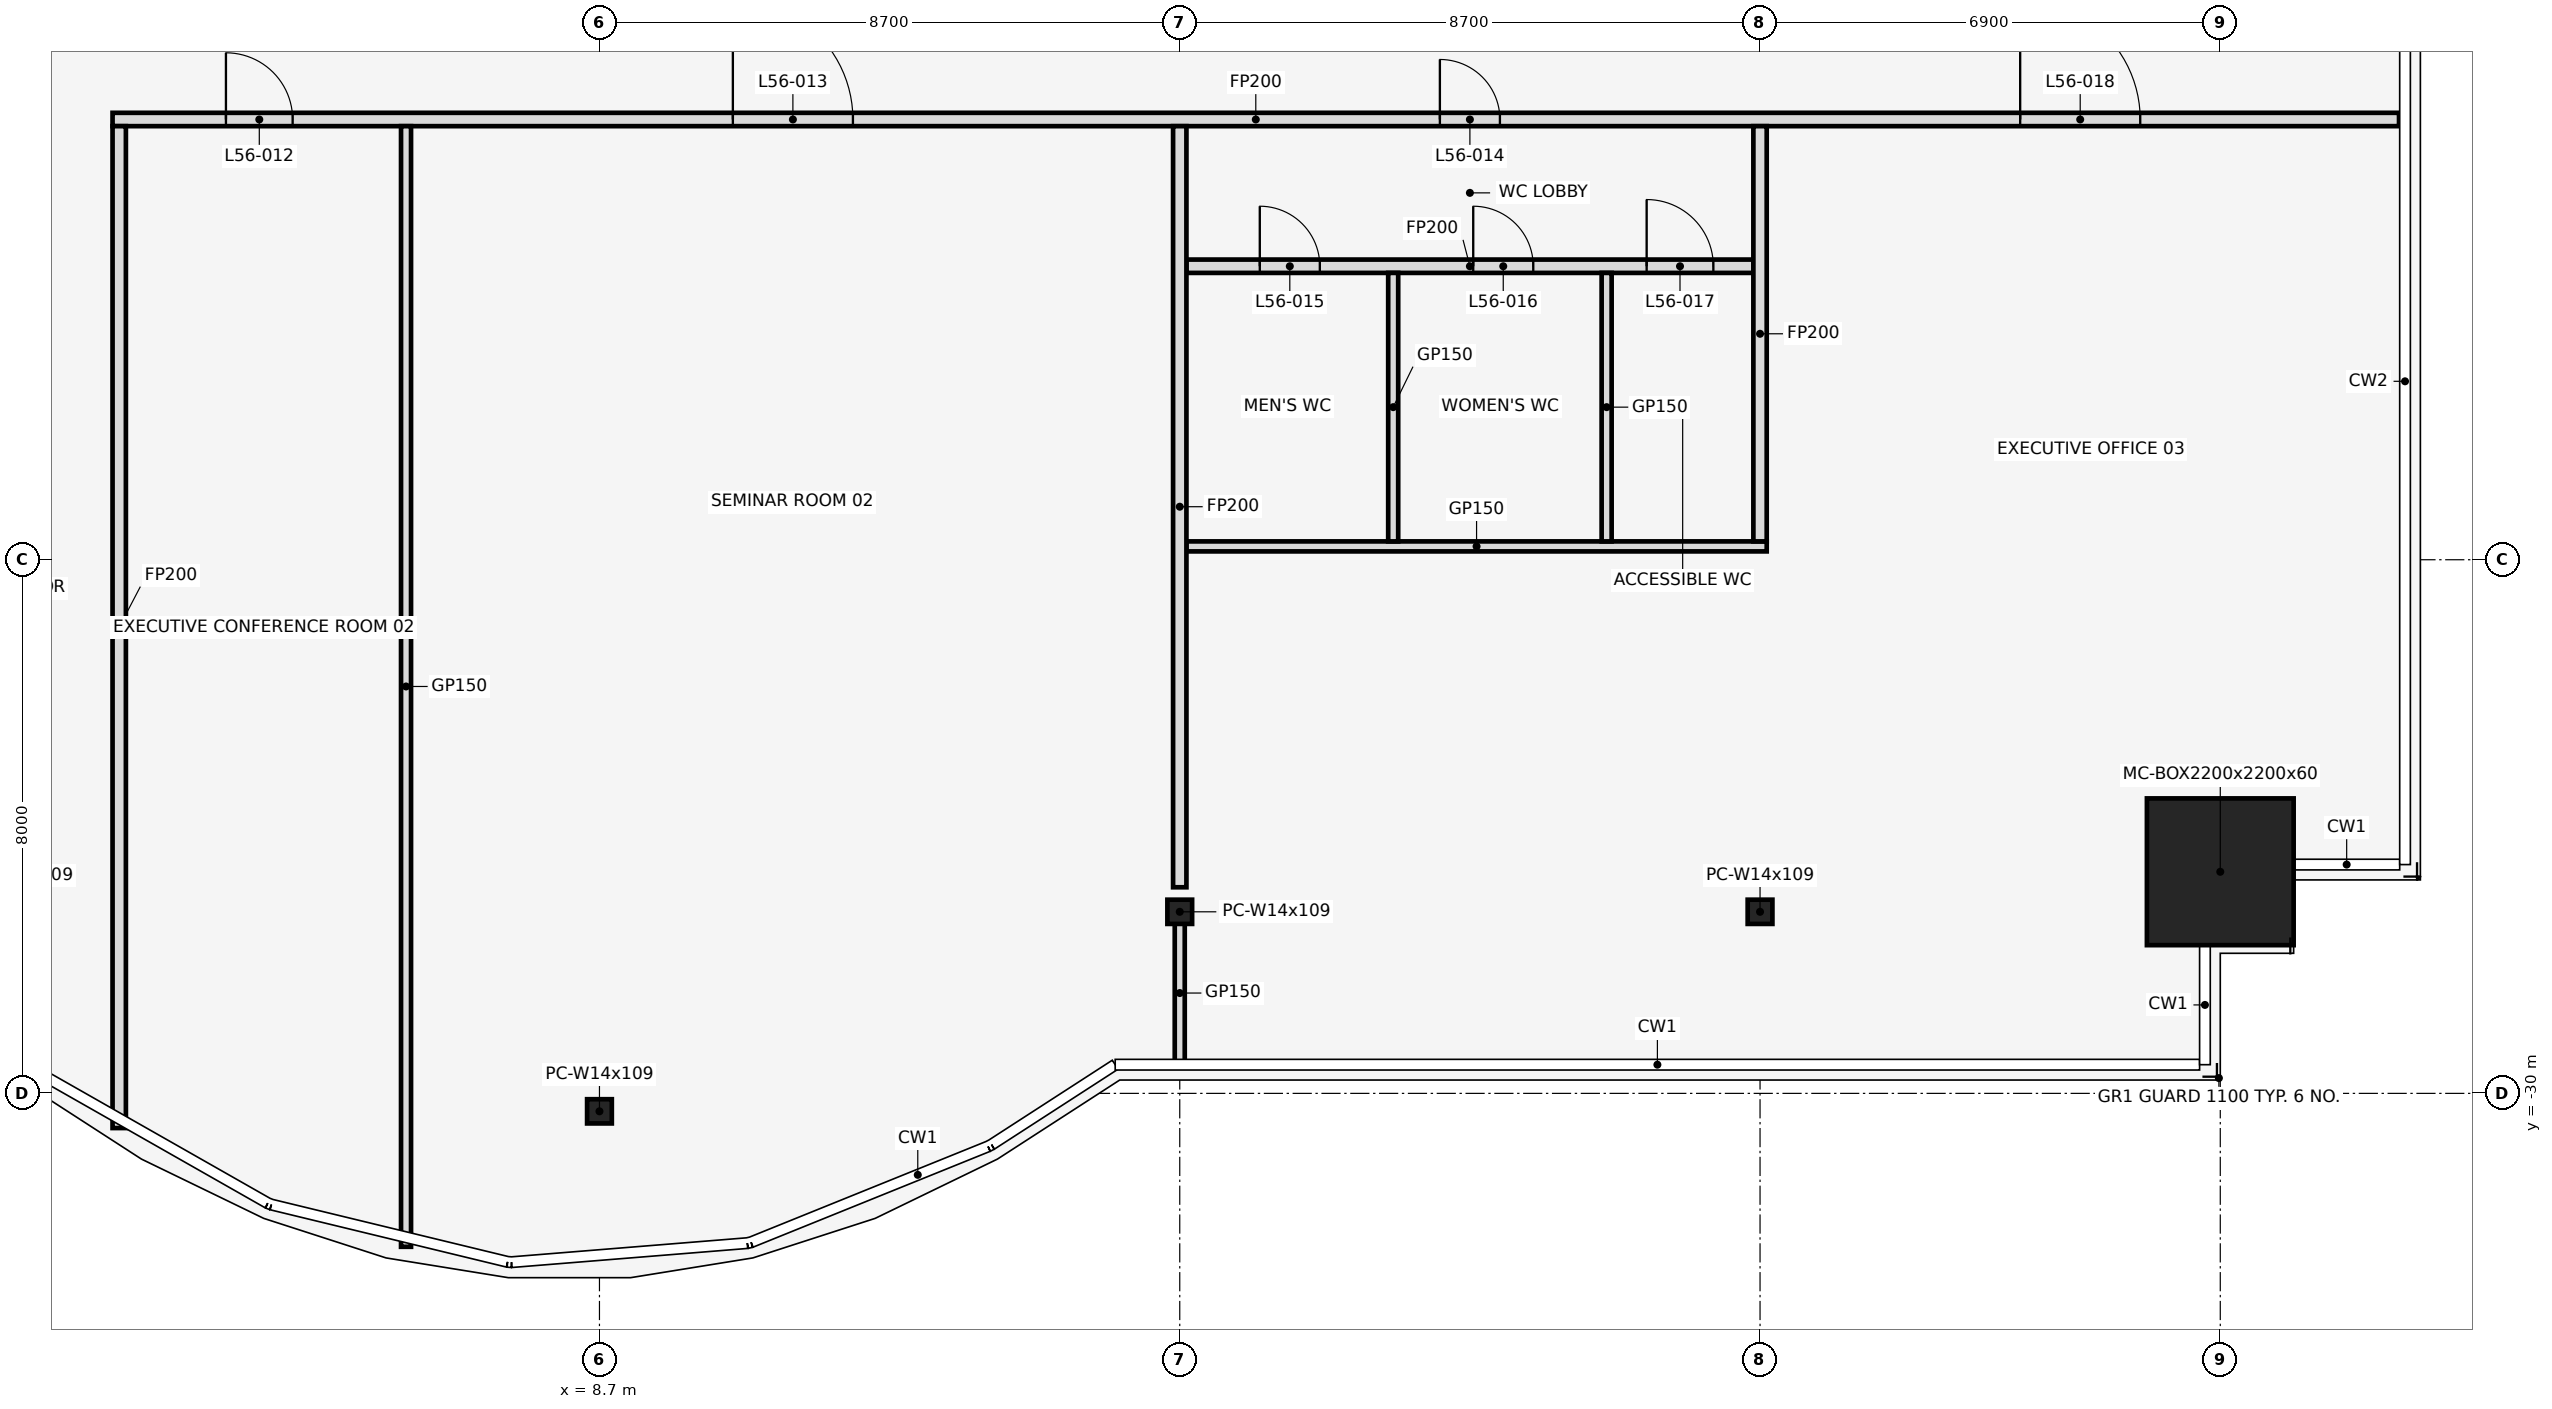
"""IFC4 building model, lengths in metres.
Left out: names, types, materials, properties, quantities, classifications, styles, units other than length and angle.
Written with IfcOpenShell. Run it as: python <this file> out.ifc"""

import sys

from ifc_helpers import new_model, si_unit, direction, frame, frame_2d, origin, origin_2d, place, context, subcontext, project, spatial, rectangle, hollow_rectangle, i_section, extrude, element, fill, save


model = new_model("IFC4")
c1 = context("Model", 3, precision=1e-05, world=origin(), true_north=direction((0.0, 1.0)))
c2 = subcontext(c1, "Body", "Model", "MODEL_VIEW")
j1 = project(units=[si_unit("LENGTHUNIT", "METRE"), si_unit("PLANEANGLEUNIT", "RADIAN")], contexts=[c1])
p1 = place(None, origin())
s1 = spatial("IfcSite", under=j1, at=p1, CompositionType="ELEMENT")
p2 = place(p1, origin())
s2 = spatial("IfcBuilding", under=s1, at=p2, CompositionType="ELEMENT")
p3 = place(p2, frame((0.0, 0.0, 249.8)))
s3 = spatial("IfcBuildingStorey", under=s2, at=p3, CompositionType="ELEMENT", Elevation=249.8)
for number, where, z_axis, x_axis in (
    (1, (8.7, -30.269, 0.0), (0.0, 0.0, 1.0), (1.0, 0.0, 0.0)),
    (2, (17.4, -27.278, 0.0), (0.0, 0.0, 1.0), (1.0, 0.0, 0.0)),
    (3, (26.1, -27.278, 0.0), (0.0, 0.0, 1.0), (1.0, 0.0, 0.0)),
):
    element("IfcColumn", number, at=place(p3, frame(where, z_axis=z_axis, x_axis=x_axis)), inside=s3, PredefinedType="COLUMN", context=c2, shape_type="SweptSolid", body=[
        extrude(i_section(OverallWidth=0.371, OverallDepth=0.363, WebThickness=0.013, FlangeThickness=0.022, at=origin_2d()), origin(), (0.0, 0.0, 1.0), 4.2),
    ])
p4 = place(p3, frame((33.0, -26.678, 0.0), z_axis=(0.0, 0.0, 1.0), x_axis=(1.0, 0.0, 0.0)))
e4 = element("IfcColumn", 4, at=p4, inside=s3, PredefinedType="COLUMN", context=c2, shape_type="SweptSolid", body=[
    extrude(hollow_rectangle(XDim=2.2, YDim=2.2, WallThickness=0.06, at=origin_2d()), origin(), (0.0, 0.0, 1.0), 4.2),
])
p5 = place(p3, frame((17.5, -21.8, 0.0), z_axis=(0.0, 0.0, 1.0), x_axis=(1.0, 0.0, 0.0)))
e5 = element("IfcWall", 5, at=p5, inside=s3, PredefinedType="PARTITIONING", context=c2, shape_type="SweptSolid", body=[
    extrude(rectangle(XDim=8.7, YDim=0.15, at=frame_2d((4.35, 0.0))), origin(), (0.0, 0.0, 1.0), 3.039),
])
p6 = place(p3, frame((17.5, -17.6, 0.0), z_axis=(0.0, 0.0, 1.0), x_axis=(1.0, 0.0, 0.0)))
e6 = element("IfcWall", 6, at=p6, inside=s3, PredefinedType="PARTITIONING", context=c2, shape_type="SweptSolid", body=[
    extrude(rectangle(XDim=8.5, YDim=0.2, at=frame_2d((4.25, 0.0))), origin(), (0.0, 0.0, 1.0), 3.039),
])
p7 = place(p6, frame((1.1, 0.0, 0.0)))
e7 = element("IfcOpeningElement", 7, at=p7, cuts=e6, PredefinedType="OPENING", context=c2, shape_type="SweptSolid", body=[
    extrude(rectangle(XDim=0.9, YDim=2.1, at=frame_2d((0.45, 1.05))), frame((0.0, 0.112, 0.0), z_axis=(0.0, -1.0, 0.0), x_axis=(1.0, 0.0, 0.0)), (0.0, 0.0, 1.0), 0.224),
])
p8 = place(p6, frame((4.3, 0.0, 0.0)))
e8 = element("IfcOpeningElement", 8, at=p8, cuts=e6, PredefinedType="OPENING", context=c2, shape_type="SweptSolid", body=[
    extrude(rectangle(XDim=0.9, YDim=2.1, at=frame_2d((0.45, 1.05))), frame((0.0, 0.112, 0.0), z_axis=(0.0, -1.0, 0.0), x_axis=(1.0, 0.0, 0.0)), (0.0, 0.0, 1.0), 0.224),
])
p9 = place(p6, frame((6.9, 0.0, 0.0)))
e9 = element("IfcOpeningElement", 9, at=p9, cuts=e6, PredefinedType="OPENING", context=c2, shape_type="SweptSolid", body=[
    extrude(rectangle(XDim=1.0, YDim=2.1, at=frame_2d((0.5, 1.05))), frame((0.0, 0.112, 0.0), z_axis=(0.0, -1.0, 0.0), x_axis=(1.0, 0.0, 0.0)), (0.0, 0.0, 1.0), 0.224),
])
p10 = place(p3, frame((1.4, -15.4, 0.0), z_axis=(0.0, 0.0, 1.0), x_axis=(1.0, 0.0, 0.0)))
e10 = element("IfcWall", 10, at=p10, inside=s3, PredefinedType="PARTITIONING", context=c2, shape_type="SweptSolid", body=[
    extrude(rectangle(XDim=34.28, YDim=0.2, at=frame_2d((17.14, 0.0))), origin(), (0.0, 0.0, 1.0), 3.039),
])
p11 = place(p10, frame((1.7, 0.0, 0.0)))
e11 = element("IfcOpeningElement", 11, at=p11, cuts=e10, PredefinedType="OPENING", context=c2, shape_type="SweptSolid", body=[
    extrude(rectangle(XDim=1.0, YDim=2.1, at=frame_2d((0.5, 1.05))), frame((0.0, 0.112, 0.0), z_axis=(0.0, -1.0, 0.0), x_axis=(1.0, 0.0, 0.0)), (0.0, 0.0, 1.0), 0.224),
])
p12 = place(p10, frame((9.3, 0.0, 0.0)))
e12 = element("IfcOpeningElement", 12, at=p12, cuts=e10, PredefinedType="OPENING", context=c2, shape_type="SweptSolid", body=[
    extrude(rectangle(XDim=1.8, YDim=2.1, at=frame_2d((0.9, 1.05))), frame((0.0, 0.112, 0.0), z_axis=(0.0, -1.0, 0.0), x_axis=(1.0, 0.0, 0.0)), (0.0, 0.0, 1.0), 0.224),
])
p13 = place(p10, frame((19.9, 0.0, 0.0)))
e13 = element("IfcOpeningElement", 13, at=p13, cuts=e10, PredefinedType="OPENING", context=c2, shape_type="SweptSolid", body=[
    extrude(rectangle(XDim=0.9, YDim=2.1, at=frame_2d((0.45, 1.05))), frame((0.0, 0.112, 0.0), z_axis=(0.0, -1.0, 0.0), x_axis=(1.0, 0.0, 0.0)), (0.0, 0.0, 1.0), 0.224),
])
p14 = place(p10, frame((28.6, 0.0, 0.0)))
e14 = element("IfcOpeningElement", 14, at=p14, cuts=e10, PredefinedType="OPENING", context=c2, shape_type="SweptSolid", body=[
    extrude(rectangle(XDim=1.8, YDim=2.1, at=frame_2d((0.9, 1.05))), frame((0.0, 0.112, 0.0), z_axis=(0.0, -1.0, 0.0), x_axis=(1.0, 0.0, 0.0)), (0.0, 0.0, 1.0), 0.224),
])
p15 = place(p3, frame((1.5, -30.52, 0.0), z_axis=(0.0, 0.0, 1.0), x_axis=(0.0, 1.0, 0.0)))
e15 = element("IfcWall", 15, at=p15, inside=s3, PredefinedType="PARTITIONING", context=c2, shape_type="SweptSolid", body=[
    extrude(rectangle(XDim=15.02, YDim=0.2, at=frame_2d((7.51, 0.0))), origin(), (0.0, 0.0, 1.0), 3.039),
])
p16 = place(p3, frame((5.8, -32.3, 0.0), z_axis=(0.0, 0.0, 1.0), x_axis=(0.0, 1.0, 0.0)))
e16 = element("IfcWall", 16, at=p16, inside=s3, PredefinedType="PARTITIONING", context=c2, shape_type="SweptSolid", body=[
    extrude(rectangle(XDim=16.8, YDim=0.15, at=frame_2d((8.4, 0.0))), origin(), (0.0, 0.0, 1.0), 3.039),
])
p17 = place(p3, frame((17.4, -29.59, 0.0), z_axis=(0.0, 0.0, 1.0), x_axis=(0.0, 1.0, 0.0)))
e17 = element("IfcWall", 17, at=p17, inside=s3, PredefinedType="PARTITIONING", context=c2, shape_type="SweptSolid", body=[
    extrude(rectangle(XDim=2.188, YDim=0.15, at=frame_2d((1.094, 0.0))), origin(), (0.0, 0.0, 1.0), 3.039),
])
p18 = place(p3, frame((17.4, -26.91, 0.0), z_axis=(0.0, 0.0, 1.0), x_axis=(0.0, 1.0, 0.0)))
e18 = element("IfcWall", 18, at=p18, inside=s3, PredefinedType="PARTITIONING", context=c2, shape_type="SweptSolid", body=[
    extrude(rectangle(XDim=11.41, YDim=0.2, at=frame_2d((5.705, 0.0))), origin(), (0.0, 0.0, 1.0), 3.039),
])
for number, where, z_axis, x_axis in (
    (19, (20.6, -21.725, 0.0), (0.0, 0.0, 1.0), (0.0, 1.0, 0.0)),
    (20, (23.8, -21.725, 0.0), (0.0, 0.0, 1.0), (0.0, 1.0, 0.0)),
):
    element("IfcWall", number, at=place(p3, frame(where, z_axis=z_axis, x_axis=x_axis)), inside=s3, PredefinedType="PARTITIONING", context=c2, shape_type="SweptSolid", body=[
        extrude(rectangle(XDim=4.025, YDim=0.15, at=frame_2d((2.013, 0.0))), origin(), (0.0, 0.0, 1.0), 3.039),
    ])
p19 = place(p3, frame((26.1, -21.725, 0.0), z_axis=(0.0, 0.0, 1.0), x_axis=(0.0, 1.0, 0.0)))
e21 = element("IfcWall", 21, at=p19, inside=s3, PredefinedType="PARTITIONING", context=c2, shape_type="SweptSolid", body=[
    extrude(rectangle(XDim=6.225, YDim=0.2, at=frame_2d((3.113, 0.0))), origin(), (0.0, 0.0, 1.0), 3.039),
])
p20 = place(p11, frame((1.0, 0.0, 0.0), z_axis=(0.0, 0.0, 1.0), x_axis=(-1.0, 0.0, 0.0)))
e22 = element("IfcDoor", 22, at=p20, inside=s3, OperationType="SINGLE_SWING_RIGHT", PredefinedType="DOOR", context=c2, shape_type="SweptSolid", body=[
    extrude(rectangle(XDim=1.0, YDim=2.1, at=frame_2d((0.5, 1.05))), frame((0.0, 0.025, 0.0), z_axis=(0.0, -1.0, 0.0), x_axis=(1.0, 0.0, 0.0)), (0.0, 0.0, 1.0), 0.05),
])
fill(e11, e22)
p21 = place(p12, origin())
e23 = element("IfcDoor", 23, at=p21, inside=s3, OperationType="SINGLE_SWING_LEFT", PredefinedType="DOOR", context=c2, shape_type="SweptSolid", body=[
    extrude(rectangle(XDim=1.8, YDim=2.1, at=frame_2d((0.9, 1.05))), frame((0.0, 0.025, 0.0), z_axis=(0.0, -1.0, 0.0), x_axis=(1.0, 0.0, 0.0)), (0.0, 0.0, 1.0), 0.05),
])
fill(e12, e23)
p22 = place(p13, frame((0.9, 0.0, 0.0), z_axis=(0.0, 0.0, 1.0), x_axis=(-1.0, 0.0, 0.0)))
e24 = element("IfcDoor", 24, at=p22, inside=s3, OperationType="SINGLE_SWING_RIGHT", PredefinedType="DOOR", context=c2, shape_type="SweptSolid", body=[
    extrude(rectangle(XDim=0.9, YDim=2.1, at=frame_2d((0.45, 1.05))), frame((0.0, 0.025, 0.0), z_axis=(0.0, -1.0, 0.0), x_axis=(1.0, 0.0, 0.0)), (0.0, 0.0, 1.0), 0.05),
])
fill(e13, e24)
p23 = place(p7, frame((0.9, 0.0, 0.0), z_axis=(0.0, 0.0, 1.0), x_axis=(-1.0, 0.0, 0.0)))
e25 = element("IfcDoor", 25, at=p23, inside=s3, OperationType="SINGLE_SWING_RIGHT", PredefinedType="DOOR", context=c2, shape_type="SweptSolid", body=[
    extrude(rectangle(XDim=0.9, YDim=2.1, at=frame_2d((0.45, 1.05))), frame((0.0, 0.025, 0.0), z_axis=(0.0, -1.0, 0.0), x_axis=(1.0, 0.0, 0.0)), (0.0, 0.0, 1.0), 0.05),
])
fill(e7, e25)
p24 = place(p8, frame((0.9, 0.0, 0.0), z_axis=(0.0, 0.0, 1.0), x_axis=(-1.0, 0.0, 0.0)))
e26 = element("IfcDoor", 26, at=p24, inside=s3, OperationType="SINGLE_SWING_LEFT", PredefinedType="DOOR", context=c2, shape_type="SweptSolid", body=[
    extrude(rectangle(XDim=0.9, YDim=2.1, at=frame_2d((0.45, 1.05))), frame((0.0, 0.025, 0.0), z_axis=(0.0, -1.0, 0.0), x_axis=(1.0, 0.0, 0.0)), (0.0, 0.0, 1.0), 0.05),
])
fill(e8, e26)
p25 = place(p9, frame((1.0, 0.0, 0.0), z_axis=(0.0, 0.0, 1.0), x_axis=(-1.0, 0.0, 0.0)))
e27 = element("IfcDoor", 27, at=p25, inside=s3, OperationType="SINGLE_SWING_RIGHT", PredefinedType="DOOR", context=c2, shape_type="SweptSolid", body=[
    extrude(rectangle(XDim=1.0, YDim=2.1, at=frame_2d((0.5, 1.05))), frame((0.0, 0.025, 0.0), z_axis=(0.0, -1.0, 0.0), x_axis=(1.0, 0.0, 0.0)), (0.0, 0.0, 1.0), 0.05),
])
fill(e9, e27)
p26 = place(p14, origin())
e28 = element("IfcDoor", 28, at=p26, inside=s3, OperationType="SINGLE_SWING_LEFT", PredefinedType="DOOR", context=c2, shape_type="SweptSolid", body=[
    extrude(rectangle(XDim=1.8, YDim=2.1, at=frame_2d((0.9, 1.05))), frame((0.0, 0.025, 0.0), z_axis=(0.0, -1.0, 0.0), x_axis=(1.0, 0.0, 0.0)), (0.0, 0.0, 1.0), 0.05),
])
fill(e14, e28)
save(model, sys.argv[1])
